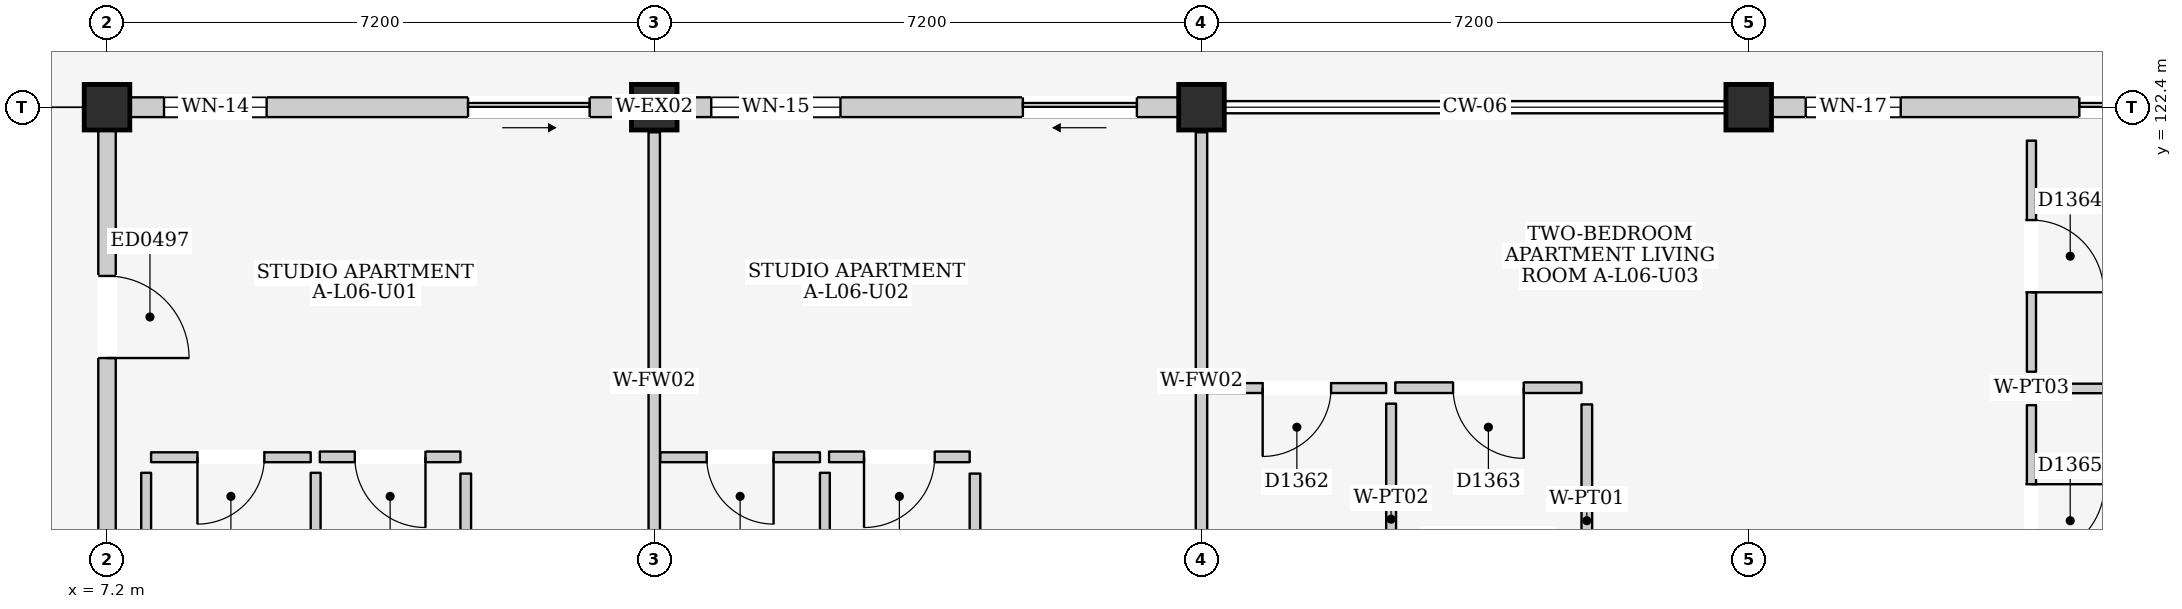
"""IFC4 building model, lengths in metres.
Left out: names, types, materials, properties, quantities, classifications, styles, units other than length and angle.
Written with IfcOpenShell. Run it as: python <this file> out.ifc"""

import sys

from ifc_helpers import new_model, si_unit, direction, frame, frame_2d, origin, origin_2d, place, context, subcontext, project, spatial, rectangle, extrude, element, fill, save


model = new_model("IFC4")
c1 = context("Model", 3, precision=1e-05, world=origin(), true_north=direction((0.0, 1.0)))
c2 = subcontext(c1, "Body", "Model", "MODEL_VIEW")
j1 = project(units=[si_unit("LENGTHUNIT", "METRE"), si_unit("PLANEANGLEUNIT", "RADIAN")], contexts=[c1])
p1 = place(None, origin())
s1 = spatial("IfcSite", under=j1, at=p1, CompositionType="ELEMENT")
p2 = place(p1, origin())
s2 = spatial("IfcBuilding", under=s1, at=p2, CompositionType="ELEMENT")
p3 = place(p2, frame((0.0, 0.0, 21.9)))
s3 = spatial("IfcBuildingStorey", under=s2, at=p3, CompositionType="ELEMENT", Elevation=21.9)
for number, where, z_axis, x_axis in (
    (1, (7.2, 122.4, 0.0), (0.0, 0.0, 1.0), (1.0, 0.0, 0.0)),
    (2, (14.4, 122.4, 0.0), (0.0, 0.0, 1.0), (1.0, 0.0, 0.0)),
    (3, (21.6, 122.4, 0.0), (0.0, 0.0, 1.0), (1.0, 0.0, 0.0)),
    (4, (28.8, 122.4, 0.0), (0.0, 0.0, 1.0), (1.0, 0.0, 0.0)),
):
    element("IfcColumn", number, at=place(p3, frame(where, z_axis=z_axis, x_axis=x_axis)), inside=s3, PredefinedType="COLUMN", context=c2, shape_type="SweptSolid", body=[
        extrude(rectangle(XDim=0.6, YDim=0.6, at=origin_2d()), origin(), (0.0, 0.0, 1.0), 3.2),
    ])
p4 = place(p3, frame((7.5, 122.4, 0.0), z_axis=(0.0, 0.0, 1.0), x_axis=(1.0, 0.0, 0.0)))
e5 = element("IfcWall", 5, at=p4, inside=s3, PredefinedType="ELEMENTEDWALL", context=c2, shape_type="SweptSolid", body=[
    extrude(rectangle(XDim=6.6, YDim=0.26, at=frame_2d((3.3, 0.0))), origin(), (0.0, 0.0, 1.0), 2.515),
])
p5 = place(p4, frame((4.45, 0.0, 0.0)))
e6 = element("IfcOpeningElement", 6, at=p5, cuts=e5, PredefinedType="OPENING", context=c2, shape_type="SweptSolid", body=[
    extrude(rectangle(XDim=1.6, YDim=2.12, at=frame_2d((0.8, 1.06))), frame((0.0, 0.145, 0.0), z_axis=(0.0, -1.0, 0.0), x_axis=(1.0, 0.0, 0.0)), (0.0, 0.0, 1.0), 0.29),
])
p6 = place(p4, frame((0.45, 0.0, 0.9)))
e7 = element("IfcOpeningElement", 7, at=p6, cuts=e5, PredefinedType="OPENING", context=c2, shape_type="SweptSolid", body=[
    extrude(rectangle(XDim=1.35, YDim=1.5, at=frame_2d((0.675, 0.75))), frame((0.0, 0.145, 0.0), z_axis=(0.0, -1.0, 0.0), x_axis=(1.0, 0.0, 0.0)), (0.0, 0.0, 1.0), 0.29),
])
p7 = place(p3, frame((14.7, 122.4, 0.0), z_axis=(0.0, 0.0, 1.0), x_axis=(1.0, 0.0, 0.0)))
e8 = element("IfcWall", 8, at=p7, inside=s3, PredefinedType="ELEMENTEDWALL", context=c2, shape_type="SweptSolid", body=[
    extrude(rectangle(XDim=6.6, YDim=0.26, at=frame_2d((3.3, 0.0))), origin(), (0.0, 0.0, 1.0), 2.515),
])
p8 = place(p7, frame((4.55, 0.0, 0.0)))
e9 = element("IfcOpeningElement", 9, at=p8, cuts=e8, PredefinedType="OPENING", context=c2, shape_type="SweptSolid", body=[
    extrude(rectangle(XDim=1.5, YDim=2.12, at=frame_2d((0.75, 1.06))), frame((0.0, 0.145, 0.0), z_axis=(0.0, -1.0, 0.0), x_axis=(1.0, 0.0, 0.0)), (0.0, 0.0, 1.0), 0.29),
])
p9 = place(p7, frame((0.45, 0.0, 0.9)))
e10 = element("IfcOpeningElement", 10, at=p9, cuts=e8, PredefinedType="OPENING", context=c2, shape_type="SweptSolid", body=[
    extrude(rectangle(XDim=1.7, YDim=1.45, at=frame_2d((0.85, 0.725))), frame((0.0, 0.145, 0.0), z_axis=(0.0, -1.0, 0.0), x_axis=(1.0, 0.0, 0.0)), (0.0, 0.0, 1.0), 0.29),
])
p10 = place(p3, frame((29.1, 122.4, 0.0), z_axis=(0.0, 0.0, 1.0), x_axis=(1.0, 0.0, 0.0)))
e11 = element("IfcWall", 11, at=p10, inside=s3, PredefinedType="ELEMENTEDWALL", context=c2, shape_type="SweptSolid", body=[
    extrude(rectangle(XDim=6.6, YDim=0.26, at=frame_2d((3.3, 0.0))), origin(), (0.0, 0.0, 1.0), 2.515),
])
p11 = place(p10, frame((4.05, 0.0, 0.0)))
e12 = element("IfcOpeningElement", 12, at=p11, cuts=e11, PredefinedType="OPENING", context=c2, shape_type="SweptSolid", body=[
    extrude(rectangle(XDim=2.0, YDim=2.12, at=frame_2d((1.0, 1.06))), frame((0.0, 0.145, 0.0), z_axis=(0.0, -1.0, 0.0), x_axis=(1.0, 0.0, 0.0)), (0.0, 0.0, 1.0), 0.29),
])
p12 = place(p10, frame((0.45, 0.0, 0.9)))
e13 = element("IfcOpeningElement", 13, at=p12, cuts=e11, PredefinedType="OPENING", context=c2, shape_type="SweptSolid", body=[
    extrude(rectangle(XDim=1.25, YDim=1.3, at=frame_2d((0.625, 0.65))), frame((0.0, 0.145, 0.0), z_axis=(0.0, -1.0, 0.0), x_axis=(1.0, 0.0, 0.0)), (0.0, 0.0, 1.0), 0.29),
])
p13 = place(p3, frame((7.2, 115.5, 0.0), z_axis=(0.0, 0.0, 1.0), x_axis=(0.0, 1.0, 0.0)))
e14 = element("IfcWall", 14, at=p13, inside=s3, PredefinedType="ELEMENTEDWALL", context=c2, shape_type="SweptSolid", body=[
    extrude(rectangle(XDim=6.6, YDim=0.23, at=frame_2d((3.3, 0.0))), origin(), (0.0, 0.0, 1.0), 2.465),
])
p14 = place(p13, frame((3.6, 0.0, 0.0)))
e15 = element("IfcOpeningElement", 15, at=p14, cuts=e14, PredefinedType="OPENING", context=c2, shape_type="SweptSolid", body=[
    extrude(rectangle(XDim=1.08, YDim=2.12, at=frame_2d((0.54, 1.06))), frame((0.0, 0.13, 0.0), z_axis=(0.0, -1.0, 0.0), x_axis=(1.0, 0.0, 0.0)), (0.0, 0.0, 1.0), 0.26),
])
p15 = place(p3, frame((14.4, 115.53, 0.0), z_axis=(0.0, 0.0, 1.0), x_axis=(0.0, 1.0, 0.0)))
e16 = element("IfcWall", 16, at=p15, inside=s3, PredefinedType="PARTITIONING", context=c2, shape_type="SweptSolid", body=[
    extrude(rectangle(XDim=6.54, YDim=0.15, at=frame_2d((3.27, 0.0))), origin(), (0.0, 0.0, 1.0), 2.465),
])
p16 = place(p3, frame((7.78, 117.795, 0.0), z_axis=(0.0, 0.0, 1.0), x_axis=(1.0, 0.0, 0.0)))
e17 = element("IfcWall", 17, at=p16, inside=s3, PredefinedType="PARTITIONING", context=c2, shape_type="SweptSolid", body=[
    extrude(rectangle(XDim=2.1, YDim=0.13, at=frame_2d((1.05, 0.0))), origin(), (0.0, 0.0, 1.0), 2.98),
])
p17 = place(p16, frame((0.61, 0.0, 0.0)))
e18 = element("IfcOpeningElement", 18, at=p17, cuts=e17, PredefinedType="OPENING", context=c2, shape_type="SweptSolid", body=[
    extrude(rectangle(XDim=0.88, YDim=2.1, at=frame_2d((0.44, 1.05))), frame((0.0, 0.08, 0.0), z_axis=(0.0, -1.0, 0.0), x_axis=(1.0, 0.0, 0.0)), (0.0, 0.0, 1.0), 0.16),
])
for number, where, z_axis, x_axis in (
    (19, (9.945, 115.46, 0.0), (0.0, 0.0, 1.0), (0.0, 1.0, 0.0)),
    (20, (7.715, 115.46, 0.0), (0.0, 0.0, 1.0), (0.0, 1.0, 0.0)),
):
    element("IfcWall", number, at=place(p3, frame(where, z_axis=z_axis, x_axis=x_axis)), inside=s3, PredefinedType="PARTITIONING", context=c2, shape_type="SweptSolid", body=[
        extrude(rectangle(XDim=2.13, YDim=0.13, at=frame_2d((1.065, 0.0))), origin(), (0.0, 0.0, 1.0), 2.98),
    ])
p18 = place(p3, frame((10.0, 117.8, 0.0), z_axis=(0.0, 0.0, 1.0), x_axis=(1.0, 0.0, 0.0)))
e21 = element("IfcWall", 21, at=p18, inside=s3, PredefinedType="PARTITIONING", context=c2, shape_type="SweptSolid", body=[
    extrude(rectangle(XDim=1.85, YDim=0.14, at=frame_2d((0.925, 0.0))), origin(), (0.0, 0.0, 1.0), 2.98),
])
p19 = place(p18, frame((0.46, 0.0, 0.0)))
e22 = element("IfcOpeningElement", 22, at=p19, cuts=e21, PredefinedType="OPENING", context=c2, shape_type="SweptSolid", body=[
    extrude(rectangle(XDim=0.93, YDim=2.14, at=frame_2d((0.465, 1.07))), frame((0.0, 0.085, 0.0), z_axis=(0.0, -1.0, 0.0), x_axis=(1.0, 0.0, 0.0)), (0.0, 0.0, 1.0), 0.17),
])
p20 = place(p3, frame((11.92, 115.43, 0.0), z_axis=(0.0, 0.0, 1.0), x_axis=(0.0, 1.0, 0.0)))
e23 = element("IfcWall", 23, at=p20, inside=s3, PredefinedType="PARTITIONING", context=c2, shape_type="SweptSolid", body=[
    extrude(rectangle(XDim=2.15, YDim=0.14, at=frame_2d((1.075, 0.0))), origin(), (0.0, 0.0, 1.0), 2.98),
])
p21 = place(p3, frame((21.6, 115.53, 0.0), z_axis=(0.0, 0.0, 1.0), x_axis=(0.0, 1.0, 0.0)))
e24 = element("IfcWall", 24, at=p21, inside=s3, PredefinedType="PARTITIONING", context=c2, shape_type="SweptSolid", body=[
    extrude(rectangle(XDim=6.54, YDim=0.15, at=frame_2d((3.27, 0.0))), origin(), (0.0, 0.0, 1.0), 2.465),
])
p22 = place(p3, frame((14.48, 117.795, 0.0), z_axis=(0.0, 0.0, 1.0), x_axis=(1.0, 0.0, 0.0)))
e25 = element("IfcWall", 25, at=p22, inside=s3, PredefinedType="PARTITIONING", context=c2, shape_type="SweptSolid", body=[
    extrude(rectangle(XDim=2.1, YDim=0.13, at=frame_2d((1.05, 0.0))), origin(), (0.0, 0.0, 1.0), 2.98),
])
p23 = place(p22, frame((0.61, 0.0, 0.0)))
e26 = element("IfcOpeningElement", 26, at=p23, cuts=e25, PredefinedType="OPENING", context=c2, shape_type="SweptSolid", body=[
    extrude(rectangle(XDim=0.88, YDim=2.1, at=frame_2d((0.44, 1.05))), frame((0.0, 0.08, 0.0), z_axis=(0.0, -1.0, 0.0), x_axis=(1.0, 0.0, 0.0)), (0.0, 0.0, 1.0), 0.16),
])
p24 = place(p3, frame((16.645, 115.46, 0.0), z_axis=(0.0, 0.0, 1.0), x_axis=(0.0, 1.0, 0.0)))
e27 = element("IfcWall", 27, at=p24, inside=s3, PredefinedType="PARTITIONING", context=c2, shape_type="SweptSolid", body=[
    extrude(rectangle(XDim=2.13, YDim=0.13, at=frame_2d((1.065, 0.0))), origin(), (0.0, 0.0, 1.0), 2.98),
])
p25 = place(p3, frame((16.7, 117.8, 0.0), z_axis=(0.0, 0.0, 1.0), x_axis=(1.0, 0.0, 0.0)))
e28 = element("IfcWall", 28, at=p25, inside=s3, PredefinedType="PARTITIONING", context=c2, shape_type="SweptSolid", body=[
    extrude(rectangle(XDim=1.85, YDim=0.14, at=frame_2d((0.925, 0.0))), origin(), (0.0, 0.0, 1.0), 2.98),
])
p26 = place(p25, frame((0.46, 0.0, 0.0)))
e29 = element("IfcOpeningElement", 29, at=p26, cuts=e28, PredefinedType="OPENING", context=c2, shape_type="SweptSolid", body=[
    extrude(rectangle(XDim=0.93, YDim=2.14, at=frame_2d((0.465, 1.07))), frame((0.0, 0.085, 0.0), z_axis=(0.0, -1.0, 0.0), x_axis=(1.0, 0.0, 0.0)), (0.0, 0.0, 1.0), 0.17),
])
p27 = place(p3, frame((18.62, 115.43, 0.0), z_axis=(0.0, 0.0, 1.0), x_axis=(0.0, 1.0, 0.0)))
e30 = element("IfcWall", 30, at=p27, inside=s3, PredefinedType="PARTITIONING", context=c2, shape_type="SweptSolid", body=[
    extrude(rectangle(XDim=2.15, YDim=0.14, at=frame_2d((1.075, 0.0))), origin(), (0.0, 0.0, 1.0), 2.98),
])
p28 = place(p3, frame((21.68, 118.705, 0.0), z_axis=(0.0, 0.0, 1.0), x_axis=(1.0, 0.0, 0.0)))
e31 = element("IfcWall", 31, at=p28, inside=s3, PredefinedType="PARTITIONING", context=c2, shape_type="SweptSolid", body=[
    extrude(rectangle(XDim=2.35, YDim=0.13, at=frame_2d((1.175, 0.0))), origin(), (0.0, 0.0, 1.0), 2.98),
])
p29 = place(p28, frame((0.725, 0.0, 0.0)))
e32 = element("IfcOpeningElement", 32, at=p29, cuts=e31, PredefinedType="OPENING", context=c2, shape_type="SweptSolid", body=[
    extrude(rectangle(XDim=0.9, YDim=2.1, at=frame_2d((0.45, 1.05))), frame((0.0, 0.08, 0.0), z_axis=(0.0, -1.0, 0.0), x_axis=(1.0, 0.0, 0.0)), (0.0, 0.0, 1.0), 0.16),
])
p30 = place(p3, frame((24.095, 115.46, 0.0), z_axis=(0.0, 0.0, 1.0), x_axis=(0.0, 1.0, 0.0)))
e33 = element("IfcWall", 33, at=p30, inside=s3, PredefinedType="PARTITIONING", context=c2, shape_type="SweptSolid", body=[
    extrude(rectangle(XDim=3.04, YDim=0.13, at=frame_2d((1.52, 0.0))), origin(), (0.0, 0.0, 1.0), 2.98),
])
p31 = place(p3, frame((24.15, 118.71, 0.0), z_axis=(0.0, 0.0, 1.0), x_axis=(1.0, 0.0, 0.0)))
e34 = element("IfcWall", 34, at=p31, inside=s3, PredefinedType="PARTITIONING", context=c2, shape_type="SweptSolid", body=[
    extrude(rectangle(XDim=2.45, YDim=0.14, at=frame_2d((1.225, 0.0))), origin(), (0.0, 0.0, 1.0), 2.98),
])
p32 = place(p31, frame((0.76, 0.0, 0.0)))
e35 = element("IfcOpeningElement", 35, at=p32, cuts=e34, PredefinedType="OPENING", context=c2, shape_type="SweptSolid", body=[
    extrude(rectangle(XDim=0.93, YDim=2.14, at=frame_2d((0.465, 1.07))), frame((0.0, 0.085, 0.0), z_axis=(0.0, -1.0, 0.0), x_axis=(1.0, 0.0, 0.0)), (0.0, 0.0, 1.0), 0.17),
])
p33 = place(p3, frame((26.67, 115.43, 0.0), z_axis=(0.0, 0.0, 1.0), x_axis=(0.0, 1.0, 0.0)))
e36 = element("IfcWall", 36, at=p33, inside=s3, PredefinedType="PARTITIONING", context=c2, shape_type="SweptSolid", body=[
    extrude(rectangle(XDim=3.06, YDim=0.14, at=frame_2d((1.53, 0.0))), origin(), (0.0, 0.0, 1.0), 2.98),
])
p34 = place(p3, frame((32.52, 118.92, 0.0), z_axis=(0.0, 0.0, 1.0), x_axis=(0.0, 1.0, 0.0)))
e37 = element("IfcWall", 37, at=p34, inside=s3, PredefinedType="PARTITIONING", context=c2, shape_type="SweptSolid", body=[
    extrude(rectangle(XDim=3.04, YDim=0.12, at=frame_2d((1.52, 0.0))), origin(), (0.0, 0.0, 1.0), 2.98),
])
p35 = place(p34, frame((1.045, 0.0, 0.0)))
e38 = element("IfcOpeningElement", 38, at=p35, cuts=e37, PredefinedType="OPENING", context=c2, shape_type="SweptSolid", body=[
    extrude(rectangle(XDim=0.95, YDim=2.15, at=frame_2d((0.475, 1.075))), frame((0.0, 0.075, 0.0), z_axis=(0.0, -1.0, 0.0), x_axis=(1.0, 0.0, 0.0)), (0.0, 0.0, 1.0), 0.15),
])
p36 = place(p3, frame((32.72, 118.7, 0.0), z_axis=(0.0, 0.0, 1.0), x_axis=(1.0, 0.0, 0.0)))
e39 = element("IfcWall", 39, at=p36, inside=s3, PredefinedType="PARTITIONING", context=c2, shape_type="SweptSolid", body=[
    extrude(rectangle(XDim=3.06, YDim=0.125, at=frame_2d((1.53, 0.0))), origin(), (0.0, 0.0, 1.0), 2.98),
])
p37 = place(p3, frame((32.52, 115.44, 0.0), z_axis=(0.0, 0.0, 1.0), x_axis=(0.0, 1.0, 0.0)))
e40 = element("IfcWall", 40, at=p37, inside=s3, PredefinedType="PARTITIONING", context=c2, shape_type="SweptSolid", body=[
    extrude(rectangle(XDim=3.04, YDim=0.12, at=frame_2d((1.52, 0.0))), origin(), (0.0, 0.0, 1.0), 2.98),
])
p38 = place(p37, frame((1.04, 0.0, 0.0)))
e41 = element("IfcOpeningElement", 41, at=p38, cuts=e40, PredefinedType="OPENING", context=c2, shape_type="SweptSolid", body=[
    extrude(rectangle(XDim=0.96, YDim=2.15, at=frame_2d((0.48, 1.075))), frame((0.0, 0.075, 0.0), z_axis=(0.0, -1.0, 0.0), x_axis=(1.0, 0.0, 0.0)), (0.0, 0.0, 1.0), 0.15),
])
p39 = place(p5, frame((1.6, 0.0, 0.0), z_axis=(0.0, 0.0, 1.0), x_axis=(-1.0, 0.0, 0.0)))
e42 = element("IfcDoor", 42, at=p39, inside=s3, OperationType="SLIDING_TO_RIGHT", PredefinedType="DOOR", context=c2, shape_type="SweptSolid", body=[
    extrude(rectangle(XDim=1.6, YDim=2.12, at=frame_2d((0.8, 1.06))), frame((0.0, 0.025, 0.0), z_axis=(0.0, -1.0, 0.0), x_axis=(1.0, 0.0, 0.0)), (0.0, 0.0, 1.0), 0.05),
])
fill(e6, e42)
p40 = place(p6, origin())
e43 = element("IfcWindow", 43, at=p40, inside=s3, PartitioningType="SINGLE_PANEL", PredefinedType="WINDOW", context=c2, shape_type="SweptSolid", body=[
    extrude(rectangle(XDim=1.35, YDim=1.5, at=frame_2d((0.675, 0.75))), frame((0.0, 0.03, 0.0), z_axis=(0.0, -1.0, 0.0), x_axis=(1.0, 0.0, 0.0)), (0.0, 0.0, 1.0), 0.06),
])
fill(e7, e43)
p41 = place(p8, frame((1.5, 0.0, 0.0), z_axis=(0.0, 0.0, 1.0), x_axis=(-1.0, 0.0, 0.0)))
e44 = element("IfcDoor", 44, at=p41, inside=s3, OperationType="SLIDING_TO_LEFT", PredefinedType="DOOR", context=c2, shape_type="SweptSolid", body=[
    extrude(rectangle(XDim=1.5, YDim=2.12, at=frame_2d((0.75, 1.06))), frame((0.0, 0.025, 0.0), z_axis=(0.0, -1.0, 0.0), x_axis=(1.0, 0.0, 0.0)), (0.0, 0.0, 1.0), 0.05),
])
fill(e9, e44)
p42 = place(p9, origin())
e45 = element("IfcWindow", 45, at=p42, inside=s3, PartitioningType="DOUBLE_PANEL_VERTICAL", PredefinedType="WINDOW", context=c2, shape_type="SweptSolid", body=[
    extrude(rectangle(XDim=1.7, YDim=1.45, at=frame_2d((0.85, 0.725))), frame((0.0, 0.03, 0.0), z_axis=(0.0, -1.0, 0.0), x_axis=(1.0, 0.0, 0.0)), (0.0, 0.0, 1.0), 0.06),
])
fill(e10, e45)
p43 = place(p11, frame((2.0, 0.0, 0.0), z_axis=(0.0, 0.0, 1.0), x_axis=(-1.0, 0.0, 0.0)))
e46 = element("IfcDoor", 46, at=p43, inside=s3, OperationType="DOUBLE_DOOR_SLIDING", PredefinedType="DOOR", context=c2, shape_type="SweptSolid", body=[
    extrude(rectangle(XDim=2.0, YDim=2.12, at=frame_2d((1.0, 1.06))), frame((0.0, 0.025, 0.0), z_axis=(0.0, -1.0, 0.0), x_axis=(1.0, 0.0, 0.0)), (0.0, 0.0, 1.0), 0.05),
])
fill(e12, e46)
p44 = place(p12, origin())
e47 = element("IfcWindow", 47, at=p44, inside=s3, PartitioningType="SINGLE_PANEL", PredefinedType="WINDOW", context=c2, shape_type="SweptSolid", body=[
    extrude(rectangle(XDim=1.25, YDim=1.3, at=frame_2d((0.625, 0.65))), frame((0.0, 0.03, 0.0), z_axis=(0.0, -1.0, 0.0), x_axis=(1.0, 0.0, 0.0)), (0.0, 0.0, 1.0), 0.06),
])
fill(e13, e47)
p45 = place(p14, frame((1.08, 0.0, 0.0), z_axis=(0.0, 0.0, 1.0), x_axis=(-1.0, 0.0, 0.0)))
e48 = element("IfcDoor", 48, at=p45, inside=s3, OperationType="SINGLE_SWING_RIGHT", PredefinedType="DOOR", context=c2, shape_type="SweptSolid", body=[
    extrude(rectangle(XDim=1.08, YDim=2.12, at=frame_2d((0.54, 1.06))), frame((0.0, 0.025, 0.0), z_axis=(0.0, -1.0, 0.0), x_axis=(1.0, 0.0, 0.0)), (0.0, 0.0, 1.0), 0.05),
])
fill(e15, e48)
p46 = place(p17, frame((0.88, 0.0, 0.0), z_axis=(0.0, 0.0, 1.0), x_axis=(-1.0, 0.0, 0.0)))
e49 = element("IfcDoor", 49, at=p46, inside=s3, OperationType="SINGLE_SWING_RIGHT", PredefinedType="DOOR", context=c2, shape_type="SweptSolid", body=[
    extrude(rectangle(XDim=0.88, YDim=2.1, at=frame_2d((0.44, 1.05))), frame((0.0, 0.025, 0.0), z_axis=(0.0, -1.0, 0.0), x_axis=(1.0, 0.0, 0.0)), (0.0, 0.0, 1.0), 0.05),
])
fill(e18, e49)
p47 = place(p19, frame((0.93, 0.0, 0.0), z_axis=(0.0, 0.0, 1.0), x_axis=(-1.0, 0.0, 0.0)))
e50 = element("IfcDoor", 50, at=p47, inside=s3, OperationType="SINGLE_SWING_LEFT", PredefinedType="DOOR", context=c2, shape_type="SweptSolid", body=[
    extrude(rectangle(XDim=0.93, YDim=2.14, at=frame_2d((0.465, 1.07))), frame((0.0, 0.025, 0.0), z_axis=(0.0, -1.0, 0.0), x_axis=(1.0, 0.0, 0.0)), (0.0, 0.0, 1.0), 0.05),
])
fill(e22, e50)
p48 = place(p23, frame((0.88, 0.0, 0.0), z_axis=(0.0, 0.0, 1.0), x_axis=(-1.0, 0.0, 0.0)))
e51 = element("IfcDoor", 51, at=p48, inside=s3, OperationType="SINGLE_SWING_LEFT", PredefinedType="DOOR", context=c2, shape_type="SweptSolid", body=[
    extrude(rectangle(XDim=0.88, YDim=2.1, at=frame_2d((0.44, 1.05))), frame((0.0, 0.025, 0.0), z_axis=(0.0, -1.0, 0.0), x_axis=(1.0, 0.0, 0.0)), (0.0, 0.0, 1.0), 0.05),
])
fill(e26, e51)
p49 = place(p26, frame((0.93, 0.0, 0.0), z_axis=(0.0, 0.0, 1.0), x_axis=(-1.0, 0.0, 0.0)))
e52 = element("IfcDoor", 52, at=p49, inside=s3, OperationType="SINGLE_SWING_RIGHT", PredefinedType="DOOR", context=c2, shape_type="SweptSolid", body=[
    extrude(rectangle(XDim=0.93, YDim=2.14, at=frame_2d((0.465, 1.07))), frame((0.0, 0.025, 0.0), z_axis=(0.0, -1.0, 0.0), x_axis=(1.0, 0.0, 0.0)), (0.0, 0.0, 1.0), 0.05),
])
fill(e29, e52)
p50 = place(p29, frame((0.9, 0.0, 0.0), z_axis=(0.0, 0.0, 1.0), x_axis=(-1.0, 0.0, 0.0)))
e53 = element("IfcDoor", 53, at=p50, inside=s3, OperationType="SINGLE_SWING_RIGHT", PredefinedType="DOOR", context=c2, shape_type="SweptSolid", body=[
    extrude(rectangle(XDim=0.9, YDim=2.1, at=frame_2d((0.45, 1.05))), frame((0.0, 0.025, 0.0), z_axis=(0.0, -1.0, 0.0), x_axis=(1.0, 0.0, 0.0)), (0.0, 0.0, 1.0), 0.05),
])
fill(e32, e53)
p51 = place(p32, frame((0.93, 0.0, 0.0), z_axis=(0.0, 0.0, 1.0), x_axis=(-1.0, 0.0, 0.0)))
e54 = element("IfcDoor", 54, at=p51, inside=s3, OperationType="SINGLE_SWING_LEFT", PredefinedType="DOOR", context=c2, shape_type="SweptSolid", body=[
    extrude(rectangle(XDim=0.93, YDim=2.14, at=frame_2d((0.465, 1.07))), frame((0.0, 0.025, 0.0), z_axis=(0.0, -1.0, 0.0), x_axis=(1.0, 0.0, 0.0)), (0.0, 0.0, 1.0), 0.05),
])
fill(e35, e54)
p52 = place(p35, frame((0.95, 0.0, 0.0), z_axis=(0.0, 0.0, 1.0), x_axis=(-1.0, 0.0, 0.0)))
e55 = element("IfcDoor", 55, at=p52, inside=s3, OperationType="SINGLE_SWING_RIGHT", PredefinedType="DOOR", context=c2, shape_type="SweptSolid", body=[
    extrude(rectangle(XDim=0.95, YDim=2.15, at=frame_2d((0.475, 1.075))), frame((0.0, 0.025, 0.0), z_axis=(0.0, -1.0, 0.0), x_axis=(1.0, 0.0, 0.0)), (0.0, 0.0, 1.0), 0.05),
])
fill(e38, e55)
p53 = place(p38, frame((0.96, 0.0, 0.0), z_axis=(0.0, 0.0, 1.0), x_axis=(-1.0, 0.0, 0.0)))
e56 = element("IfcDoor", 56, at=p53, inside=s3, OperationType="SINGLE_SWING_LEFT", PredefinedType="DOOR", context=c2, shape_type="SweptSolid", body=[
    extrude(rectangle(XDim=0.96, YDim=2.15, at=frame_2d((0.48, 1.075))), frame((0.0, 0.025, 0.0), z_axis=(0.0, -1.0, 0.0), x_axis=(1.0, 0.0, 0.0)), (0.0, 0.0, 1.0), 0.05),
])
fill(e41, e56)
save(model, sys.argv[1])
